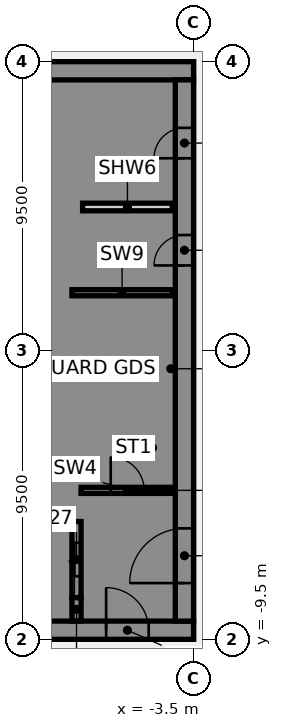
"""IFC4 building model, lengths in metres.
Left out: names, types, materials, properties, quantities, classifications, styles, units other than length and angle.
Written with IfcOpenShell. Run it as: python <this file> out.ifc"""

import sys

from ifc_helpers import new_model, si_unit, direction, frame, frame_2d, origin, place, context, subcontext, project, spatial, polyline, rectangle, outline, extrude, element, fill, save


model = new_model("IFC4")
c1 = context("Model", 3, precision=1e-05, world=origin(), true_north=direction((0.0, 1.0)))
c2 = subcontext(c1, "Body", "Model", "MODEL_VIEW")
j1 = project(units=[si_unit("LENGTHUNIT", "METRE"), si_unit("PLANEANGLEUNIT", "RADIAN")], contexts=[c1])
p1 = place(None, origin())
s1 = spatial("IfcSite", under=j1, at=p1, CompositionType="ELEMENT")
p2 = place(p1, origin())
s2 = spatial("IfcBuilding", under=s1, at=p2, CompositionType="ELEMENT")
p3 = place(p2, frame((0.0, 0.0, 113.5)))
s3 = spatial("IfcBuildingStorey", under=s2, at=p3, CompositionType="ELEMENT", Elevation=113.5)
p4 = place(p3, frame((-16.5, -9.2, 0.0), z_axis=(0.0, 0.0, 1.0), x_axis=(1.0, 0.0, 0.0)))
e1 = element("IfcWall", 1, at=p4, inside=s3, PredefinedType="SHEAR", context=c2, shape_type="SweptSolid", body=[
    extrude(rectangle(XDim=13.0, YDim=0.6, at=frame_2d((6.5, 0.0))), origin(), (0.0, 0.0, 1.0), 3.61),
])
p5 = place(p4, frame((4.15, 0.0, 0.0)))
e2 = element("IfcOpeningElement", 2, at=p5, cuts=e1, PredefinedType="OPENING", context=c2, shape_type="SweptSolid", body=[
    extrude(rectangle(XDim=1.4, YDim=2.1, at=frame_2d((0.7, 1.05))), frame((0.0, 0.31, 0.0), z_axis=(0.0, -1.0, 0.0), x_axis=(1.0, 0.0, 0.0)), (0.0, 0.0, 1.0), 0.62),
])
p6 = place(p4, frame((10.125, 0.0, 0.0)))
e3 = element("IfcOpeningElement", 3, at=p6, cuts=e1, PredefinedType="OPENING", context=c2, shape_type="SweptSolid", body=[
    extrude(rectangle(XDim=1.4, YDim=2.1, at=frame_2d((0.7, 1.05))), frame((0.0, 0.31, 0.0), z_axis=(0.0, -1.0, 0.0), x_axis=(1.0, 0.0, 0.0)), (0.0, 0.0, 1.0), 0.62),
])
p7 = place(p3, frame((-16.5, 9.2, 0.0), z_axis=(0.0, 0.0, 1.0), x_axis=(1.0, 0.0, 0.0)))
e4 = element("IfcWall", 4, at=p7, inside=s3, PredefinedType="SHEAR", context=c2, shape_type="SweptSolid", body=[
    extrude(rectangle(XDim=13.0, YDim=0.6, at=frame_2d((6.5, 0.0))), origin(), (0.0, 0.0, 1.0), 3.61),
])
p8 = place(p3, origin())
e5 = element("IfcWall", 5, at=p8, inside=s3, PredefinedType="SHEAR", context=c2, shape_type="SweptSolid", body=[
    extrude(outline(polyline([(-9.8, -5.375), (-9.8, -5.625), (-7.5, -5.625), (-7.2, -5.625), (-7.2, 8.9), (-7.5, 8.9), (-9.8, 8.9), (-9.8, 8.125), (-7.5, 8.125), (-7.5, 5.625), (-9.8, 5.625), (-9.8, 5.375), (-7.5, 5.375), (-7.5, 2.875), (-9.8, 2.875), (-9.8, 2.625), (-7.5, 2.625), (-7.5, 0.125), (-9.8, 0.125), (-9.8, -0.125), (-7.5, -0.125), (-7.5, -2.625), (-9.8, -2.625), (-9.8, -2.875), (-7.5, -2.875), (-7.5, -5.375), (-9.8, -5.375)])), origin(), (0.0, 0.0, 1.0), 3.61),
])
p9 = place(p3, origin())
e6 = element("IfcWall", 6, at=p9, inside=s3, PredefinedType="SHEAR", context=c2, shape_type="SweptSolid", body=[
    extrude(outline(polyline([(-7.5, -8.125), (-9.55, -8.125), (-9.55, -5.625), (-9.8, -5.625), (-9.8, -8.125), (-9.8, -8.9), (-7.5, -8.9), (-7.5, -8.125)])), origin(), (0.0, 0.0, 1.0), 3.61),
])
p10 = place(p3, frame((-7.35, -8.9, 0.0), z_axis=(0.0, 0.0, 1.0), x_axis=(0.0, 1.0, 0.0)))
e7 = element("IfcWall", 7, at=p10, inside=s3, PredefinedType="SHEAR", context=c2, shape_type="SweptSolid", body=[
    extrude(rectangle(XDim=0.775, YDim=0.3, at=frame_2d((0.387, 0.0))), origin(), (0.0, 0.0, 1.0), 3.61),
])
p11 = place(p3, frame((-7.5, 1.9, 0.0), z_axis=(0.0, 0.0, 1.0), x_axis=(1.0, 0.0, 0.0)))
e8 = element("IfcWall", 8, at=p11, inside=s3, PredefinedType="SHEAR", context=c2, shape_type="SweptSolid", body=[
    extrude(rectangle(XDim=3.3, YDim=0.2, at=frame_2d((1.65, 0.0))), origin(), (0.0, 0.0, 1.0), 3.61),
])
p12 = place(p3, frame((-7.35, -8.125, 0.0), z_axis=(0.0, 0.0, 1.0), x_axis=(0.0, 1.0, 0.0)))
e9 = element("IfcWall", 9, at=p12, inside=s3, PredefinedType="SHEAR", context=c2, shape_type="SweptSolid", body=[
    extrude(rectangle(XDim=2.5, YDim=0.3, at=frame_2d((1.25, 0.0))), origin(), (0.0, 0.0, 1.0), 3.61),
])
p13 = place(p12, frame((0.7, 0.0, 0.0)))
e10 = element("IfcOpeningElement", 10, at=p13, cuts=e9, PredefinedType="OPENING", context=c2, shape_type="SweptSolid", body=[
    extrude(rectangle(XDim=1.1, YDim=2.1, at=frame_2d((0.55, 1.05))), frame((0.0, 0.16, 0.0), z_axis=(0.0, -1.0, 0.0), x_axis=(1.0, 0.0, 0.0)), (0.0, 0.0, 1.0), 0.32),
])
p14 = place(p3, frame((-3.8, -8.9, 0.0), z_axis=(0.0, 0.0, 1.0), x_axis=(0.0, 1.0, 0.0)))
e11 = element("IfcWall", 11, at=p14, inside=s3, PredefinedType="SHEAR", context=c2, shape_type="SweptSolid", body=[
    extrude(rectangle(XDim=17.8, YDim=0.6, at=frame_2d((8.9, 0.0))), origin(), (0.0, 0.0, 1.0), 3.61),
])
p15 = place(p14, frame((1.25, 0.0, 0.0)))
e12 = element("IfcOpeningElement", 12, at=p15, cuts=e11, PredefinedType="OPENING", context=c2, shape_type="SweptSolid", body=[
    extrude(rectangle(XDim=1.8, YDim=2.1, at=frame_2d((0.9, 1.05))), frame((0.0, 0.31, 0.0), z_axis=(0.0, -1.0, 0.0), x_axis=(1.0, 0.0, 0.0)), (0.0, 0.0, 1.0), 0.62),
])
p16 = place(p14, frame((11.698, 0.0, 0.0)))
e13 = element("IfcOpeningElement", 13, at=p16, cuts=e11, PredefinedType="OPENING", context=c2, shape_type="SweptSolid", body=[
    extrude(rectangle(XDim=1.0, YDim=2.1, at=frame_2d((0.5, 1.05))), frame((0.0, 0.31, 0.0), z_axis=(0.0, -1.0, 0.0), x_axis=(1.0, 0.0, 0.0)), (0.0, 0.0, 1.0), 0.62),
])
p17 = place(p14, frame((15.222, 0.0, 0.0)))
e14 = element("IfcOpeningElement", 14, at=p17, cuts=e11, PredefinedType="OPENING", context=c2, shape_type="SweptSolid", body=[
    extrude(rectangle(XDim=1.0, YDim=2.1, at=frame_2d((0.5, 1.05))), frame((0.0, 0.31, 0.0), z_axis=(0.0, -1.0, 0.0), x_axis=(1.0, 0.0, 0.0)), (0.0, 0.0, 1.0), 0.62),
])
p18 = place(p3, frame((-7.15, 4.72, 0.0), z_axis=(0.0, 0.0, 1.0), x_axis=(1.0, 0.0, 0.0)))
e15 = element("IfcWall", 15, at=p18, inside=s3, PredefinedType="PARTITIONING", context=c2, shape_type="SweptSolid", body=[
    extrude(rectangle(XDim=2.95, YDim=0.25, at=frame_2d((1.475, 0.0))), origin(), (0.0, 0.0, 1.0), 3.61),
])
p19 = place(p3, frame((-7.2, -4.6, 0.0), z_axis=(0.0, 0.0, 1.0), x_axis=(1.0, 0.0, 0.0)))
e16 = element("IfcWall", 16, at=p19, inside=s3, PredefinedType="SHEAR", context=c2, shape_type="SweptSolid", body=[
    extrude(rectangle(XDim=3.1, YDim=0.2, at=frame_2d((1.55, 0.0))), origin(), (0.0, 0.0, 1.0), 3.61),
])
p20 = place(p19, frame((0.975, 0.0, 0.0)))
e17 = element("IfcOpeningElement", 17, at=p20, cuts=e16, PredefinedType="OPENING", context=c2, shape_type="SweptSolid", body=[
    extrude(rectangle(XDim=1.1, YDim=2.1, at=frame_2d((0.55, 1.05))), frame((0.0, 0.11, 0.0), z_axis=(0.0, -1.0, 0.0), x_axis=(1.0, 0.0, 0.0)), (0.0, 0.0, 1.0), 0.22),
])
p21 = place(p6, origin())
e18 = element("IfcDoor", 18, at=p21, inside=s3, OperationType="SINGLE_SWING_LEFT", PredefinedType="DOOR", context=c2, shape_type="SweptSolid", body=[
    extrude(rectangle(XDim=1.4, YDim=2.1, at=frame_2d((0.7, 1.05))), frame((0.0, 0.025, 0.0), z_axis=(0.0, -1.0, 0.0), x_axis=(1.0, 0.0, 0.0)), (0.0, 0.0, 1.0), 0.05),
])
fill(e3, e18)
p22 = place(p15, origin())
e19 = element("IfcDoor", 19, at=p22, inside=s3, OperationType="SINGLE_SWING_LEFT", PredefinedType="DOOR", context=c2, shape_type="SweptSolid", body=[
    extrude(rectangle(XDim=1.8, YDim=2.1, at=frame_2d((0.9, 1.05))), frame((0.0, 0.025, 0.0), z_axis=(0.0, -1.0, 0.0), x_axis=(1.0, 0.0, 0.0)), (0.0, 0.0, 1.0), 0.05),
])
fill(e12, e19)
p23 = place(p16, origin())
e20 = element("IfcDoor", 20, at=p23, inside=s3, OperationType="SINGLE_SWING_LEFT", PredefinedType="DOOR", context=c2, shape_type="SweptSolid", body=[
    extrude(rectangle(XDim=1.0, YDim=2.1, at=frame_2d((0.5, 1.05))), frame((0.0, 0.275, 0.0), z_axis=(0.0, -1.0, 0.0), x_axis=(1.0, 0.0, 0.0)), (0.0, 0.0, 1.0), 0.05),
])
fill(e13, e20)
p24 = place(p17, origin())
e21 = element("IfcDoor", 21, at=p24, inside=s3, OperationType="SINGLE_SWING_LEFT", PredefinedType="DOOR", context=c2, shape_type="SweptSolid", body=[
    extrude(rectangle(XDim=1.0, YDim=2.1, at=frame_2d((0.5, 1.05))), frame((0.0, 0.275, 0.0), z_axis=(0.0, -1.0, 0.0), x_axis=(1.0, 0.0, 0.0)), (0.0, 0.0, 1.0), 0.05),
])
fill(e14, e21)
p25 = place(p20, origin())
e22 = element("IfcDoor", 22, at=p25, inside=s3, OperationType="SINGLE_SWING_LEFT", PredefinedType="DOOR", context=c2, shape_type="SweptSolid", body=[
    extrude(rectangle(XDim=1.1, YDim=2.1, at=frame_2d((0.55, 1.05))), frame((0.0, 0.025, 0.0), z_axis=(0.0, -1.0, 0.0), x_axis=(1.0, 0.0, 0.0)), (0.0, 0.0, 1.0), 0.05),
])
fill(e17, e22)
p26 = place(p13, origin())
e23 = element("IfcDoor", 23, at=p26, inside=s3, OperationType="SLIDING_TO_LEFT", PredefinedType="DOOR", context=c2, shape_type="SweptSolid", body=[
    extrude(rectangle(XDim=1.1, YDim=2.1, at=frame_2d((0.55, 1.05))), frame((0.0, 0.025, 0.0), z_axis=(0.0, -1.0, 0.0), x_axis=(1.0, 0.0, 0.0)), (0.0, 0.0, 1.0), 0.05),
])
fill(e10, e23)
save(model, sys.argv[1])
